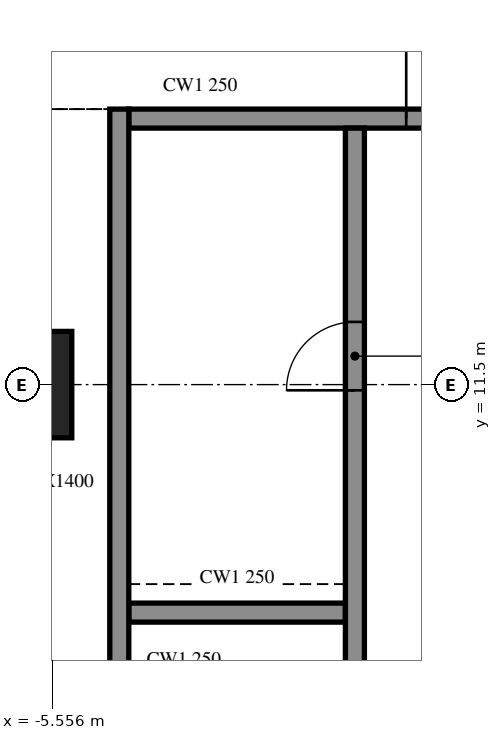
"""IFC4 building model, lengths in metres.
Left out: names, types, materials, properties, quantities, classifications, styles, units other than length and angle.
Written with IfcOpenShell. Run it as: python <this file> out.ifc"""

import sys

from ifc_helpers import new_model, si_unit, direction, frame, frame_2d, origin, origin_2d, place, context, subcontext, project, spatial, rectangle, extrude, element, fill, save


model = new_model("IFC4")
c1 = context("Model", 3, precision=1e-05, world=origin(), true_north=direction((0.0, 1.0)))
c2 = subcontext(c1, "Body", "Model", "MODEL_VIEW")
j1 = project(units=[si_unit("LENGTHUNIT", "METRE"), si_unit("PLANEANGLEUNIT", "RADIAN")], contexts=[c1])
p1 = place(None, origin())
s1 = spatial("IfcSite", under=j1, at=p1, CompositionType="ELEMENT")
p2 = place(p1, origin())
s2 = spatial("IfcBuilding", under=s1, at=p2, CompositionType="ELEMENT")
p3 = place(p2, frame((0.0, 0.0, 117.6)))
s3 = spatial("IfcBuildingStorey", under=s2, at=p3, CompositionType="ELEMENT", Elevation=117.6)
p4 = place(p3, frame((-6.0, 11.5, -0.55), z_axis=(0.0, 0.0, 1.0), x_axis=(1.0, 0.0, 0.0)))
e1 = element("IfcColumn", 1, at=p4, inside=s3, PredefinedType="COLUMN", context=c2, shape_type="SweptSolid", body=[
    extrude(rectangle(XDim=1.4, YDim=1.4, at=origin_2d()), origin(), (0.0, 0.0, 1.0), 4.61),
])
p5 = place(p3, frame((-4.675, 15.125, 0.0), z_axis=(0.0, 0.0, 1.0), x_axis=(0.0, -1.0, 0.0)))
e2 = element("IfcWall", 2, at=p5, inside=s3, PredefinedType="SOLIDWALL", context=c2, shape_type="SweptSolid", body=[
    extrude(rectangle(XDim=24.25, YDim=0.25, at=frame_2d((12.125, 0.0))), origin(), (0.0, 0.0, 1.0), 4.06),
])
p6 = place(p3, frame((-4.55, 15.0, 0.0), z_axis=(0.0, 0.0, 1.0), x_axis=(1.0, 0.0, 0.0)))
e3 = element("IfcWall", 3, at=p6, inside=s3, PredefinedType="SOLIDWALL", context=c2, shape_type="SweptSolid", body=[
    extrude(rectangle(XDim=9.1, YDim=0.25, at=frame_2d((4.55, 0.0))), origin(), (0.0, 0.0, 1.0), 4.06),
])
p7 = place(p6, frame((3.65, 0.0, 0.0)))
e4 = element("IfcOpeningElement", 4, at=p7, cuts=e3, PredefinedType="OPENING", context=c2, shape_type="SweptSolid", body=[
    extrude(rectangle(XDim=1.8, YDim=2.1, at=frame_2d((0.9, 1.05))), frame((0.0, 0.135, 0.0), z_axis=(0.0, -1.0, 0.0), x_axis=(1.0, 0.0, 0.0)), (0.0, 0.0, 1.0), 0.27),
])
p8 = place(p3, frame((-1.575, -8.875, 0.0), z_axis=(0.0, 0.0, 1.0), x_axis=(0.0, 1.0, 0.0)))
e5 = element("IfcWall", 5, at=p8, inside=s3, PredefinedType="SOLIDWALL", context=c2, shape_type="SweptSolid", body=[
    extrude(rectangle(XDim=23.75, YDim=0.25, at=frame_2d((11.875, 0.0))), origin(), (0.0, 0.0, 1.0), 4.06),
])
p9 = place(p8, frame((8.7, 0.0, 0.0)))
e6 = element("IfcOpeningElement", 6, at=p9, cuts=e5, PredefinedType="OPENING", context=c2, shape_type="SweptSolid", body=[
    extrude(rectangle(XDim=0.9, YDim=2.1, at=frame_2d((0.45, 1.05))), frame((0.0, 0.135, 0.0), z_axis=(0.0, -1.0, 0.0), x_axis=(1.0, 0.0, 0.0)), (0.0, 0.0, 1.0), 0.27),
])
p10 = place(p8, frame((14.15, 0.0, 0.0)))
e7 = element("IfcOpeningElement", 7, at=p10, cuts=e5, PredefinedType="OPENING", context=c2, shape_type="SweptSolid", body=[
    extrude(rectangle(XDim=0.9, YDim=2.1, at=frame_2d((0.45, 1.05))), frame((0.0, 0.135, 0.0), z_axis=(0.0, -1.0, 0.0), x_axis=(1.0, 0.0, 0.0)), (0.0, 0.0, 1.0), 0.27),
])
p11 = place(p8, frame((0.712, 0.0, 0.0)))
e8 = element("IfcOpeningElement", 8, at=p11, cuts=e5, PredefinedType="OPENING", context=c2, shape_type="SweptSolid", body=[
    extrude(rectangle(XDim=0.9, YDim=2.1, at=frame_2d((0.45, 1.05))), frame((0.0, 0.135, 0.0), z_axis=(0.0, -1.0, 0.0), x_axis=(1.0, 0.0, 0.0)), (0.0, 0.0, 1.0), 0.27),
])
p12 = place(p8, frame((3.788, 0.0, 0.0)))
e9 = element("IfcOpeningElement", 9, at=p12, cuts=e5, PredefinedType="OPENING", context=c2, shape_type="SweptSolid", body=[
    extrude(rectangle(XDim=0.9, YDim=2.1, at=frame_2d((0.45, 1.05))), frame((0.0, 0.135, 0.0), z_axis=(0.0, -1.0, 0.0), x_axis=(1.0, 0.0, 0.0)), (0.0, 0.0, 1.0), 0.27),
])
p13 = place(p8, frame((20.3, 0.0, 0.0)))
e10 = element("IfcOpeningElement", 10, at=p13, cuts=e5, PredefinedType="OPENING", context=c2, shape_type="SweptSolid", body=[
    extrude(rectangle(XDim=0.9, YDim=2.1, at=frame_2d((0.45, 1.05))), frame((0.0, 0.135, 0.0), z_axis=(0.0, -1.0, 0.0), x_axis=(1.0, 0.0, 0.0)), (0.0, 0.0, 1.0), 0.27),
])
p14 = place(p3, frame((-4.55, 8.5, 0.0), z_axis=(0.0, 0.0, 1.0), x_axis=(1.0, 0.0, 0.0)))
e11 = element("IfcWall", 11, at=p14, inside=s3, PredefinedType="SOLIDWALL", context=c2, shape_type="SweptSolid", body=[
    extrude(rectangle(XDim=2.85, YDim=0.25, at=frame_2d((1.425, 0.0))), origin(), (0.0, 0.0, 1.0), 4.06),
])
p15 = place(p7, origin())
e12 = element("IfcDoor", 12, at=p15, inside=s3, OperationType="DOUBLE_DOOR_SINGLE_SWING", PredefinedType="DOOR", context=c2, shape_type="SweptSolid", body=[
    extrude(rectangle(XDim=1.8, YDim=2.1, at=frame_2d((0.9, 1.05))), frame((0.0, 0.025, 0.0), z_axis=(0.0, -1.0, 0.0), x_axis=(1.0, 0.0, 0.0)), (0.0, 0.0, 1.0), 0.05),
])
fill(e4, e12)
p16 = place(p13, origin())
e13 = element("IfcDoor", 13, at=p16, inside=s3, OperationType="SINGLE_SWING_RIGHT", PredefinedType="DOOR", context=c2, shape_type="SweptSolid", body=[
    extrude(rectangle(XDim=0.9, YDim=2.1, at=frame_2d((0.45, 1.05))), frame((0.0, 0.025, 0.0), z_axis=(0.0, -1.0, 0.0), x_axis=(1.0, 0.0, 0.0)), (0.0, 0.0, 1.0), 0.05),
])
fill(e10, e13)
save(model, sys.argv[1])
